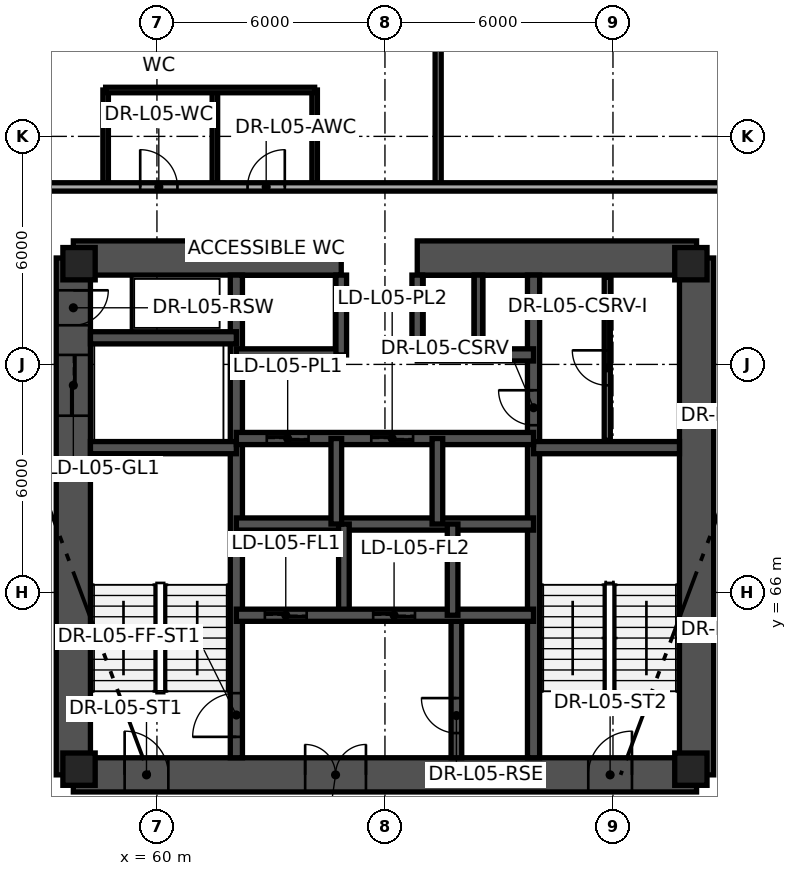
"""IFC4 building model, lengths in metres.
Left out: names, types, materials, properties, quantities, classifications, styles, units other than length and angle.
Written with IfcOpenShell. Run it as: python <this file> out.ifc"""

import sys

from ifc_helpers import new_model, si_unit, direction, frame, frame_2d, origin, origin_2d, place, context, subcontext, project, spatial, rectangle, extrude, element, fill, save


model = new_model("IFC4")
c1 = context("Model", 3, precision=1e-05, world=origin(), true_north=direction((0.0, 1.0)))
c2 = subcontext(c1, "Body", "Model", "MODEL_VIEW")
j1 = project(units=[si_unit("LENGTHUNIT", "METRE"), si_unit("PLANEANGLEUNIT", "RADIAN")], contexts=[c1])
p1 = place(None, origin())
s1 = spatial("IfcSite", under=j1, at=p1, CompositionType="ELEMENT")
p2 = place(p1, origin())
s2 = spatial("IfcBuilding", under=s1, at=p2, CompositionType="ELEMENT")
p3 = place(p2, frame((0.0, 0.0, 22.8)))
s3 = spatial("IfcBuildingStorey", under=s2, at=p3, CompositionType="ELEMENT", Elevation=22.8)
p4 = place(p3, frame((57.8, 61.2, 0.0), z_axis=(0.0, 0.0, 1.0), x_axis=(1.0, 0.0, 0.0)))
e1 = element("IfcWall", 1, at=p4, inside=s3, PredefinedType="SHEAR", context=c2, shape_type="SweptSolid", body=[
    extrude(rectangle(XDim=16.4, YDim=0.9, at=frame_2d((8.2, 0.0))), origin(), (0.0, 0.0, 1.0), 3.65),
])
p5 = place(p4, frame((1.35, 0.0, 0.0)))
e2 = element("IfcOpeningElement", 2, at=p5, cuts=e1, PredefinedType="OPENING", context=c2, shape_type="SweptSolid", body=[
    extrude(rectangle(XDim=1.15, YDim=2.15, at=frame_2d((0.575, 1.075))), frame((0.0, 0.46, 0.0), z_axis=(0.0, -1.0, 0.0), x_axis=(1.0, 0.0, 0.0)), (0.0, 0.0, 1.0), 0.92),
])
p6 = place(p4, frame((6.1, 0.0, 0.0)))
e3 = element("IfcOpeningElement", 3, at=p6, cuts=e1, PredefinedType="OPENING", context=c2, shape_type="SweptSolid", body=[
    extrude(rectangle(XDim=1.6, YDim=2.15, at=frame_2d((0.8, 1.075))), frame((0.0, 0.46, 0.0), z_axis=(0.0, -1.0, 0.0), x_axis=(1.0, 0.0, 0.0)), (0.0, 0.0, 1.0), 0.92),
])
p7 = place(p4, frame((13.55, 0.0, 0.0)))
e4 = element("IfcOpeningElement", 4, at=p7, cuts=e1, PredefinedType="OPENING", context=c2, shape_type="SweptSolid", body=[
    extrude(rectangle(XDim=1.15, YDim=2.15, at=frame_2d((0.575, 1.075))), frame((0.0, 0.46, 0.0), z_axis=(0.0, -1.0, 0.0), x_axis=(1.0, 0.0, 0.0)), (0.0, 0.0, 1.0), 0.92),
])
p8 = place(p3, frame((74.2, 61.2, 0.0), z_axis=(0.0, 0.0, 1.0), x_axis=(0.0, 1.0, 0.0)))
e5 = element("IfcWall", 5, at=p8, inside=s3, PredefinedType="SHEAR", context=c2, shape_type="SweptSolid", body=[
    extrude(rectangle(XDim=13.6, YDim=0.9, at=frame_2d((6.8, 0.0))), origin(), (0.0, 0.0, 1.0), 3.65),
])
p9 = place(p3, frame((74.2, 74.8, 0.0), z_axis=(0.0, 0.0, 1.0), x_axis=(-1.0, 0.0, 0.0)))
e6 = element("IfcWall", 6, at=p9, inside=s3, PredefinedType="SHEAR", context=c2, shape_type="SweptSolid", body=[
    extrude(rectangle(XDim=7.35, YDim=0.9, at=frame_2d((3.675, 0.0))), origin(), (0.0, 0.0, 1.0), 3.65),
])
p10 = place(p3, frame((64.85, 74.8, 0.0), z_axis=(0.0, 0.0, 1.0), x_axis=(-1.0, 0.0, 0.0)))
e7 = element("IfcWall", 7, at=p10, inside=s3, PredefinedType="SHEAR", context=c2, shape_type="SweptSolid", body=[
    extrude(rectangle(XDim=7.05, YDim=0.9, at=frame_2d((3.525, 0.0))), origin(), (0.0, 0.0, 1.0), 3.65),
])
p11 = place(p3, frame((57.8, 74.8, 0.0), z_axis=(0.0, 0.0, 1.0), x_axis=(0.0, -1.0, 0.0)))
e8 = element("IfcWall", 8, at=p11, inside=s3, PredefinedType="SHEAR", context=c2, shape_type="SweptSolid", body=[
    extrude(rectangle(XDim=13.6, YDim=0.9, at=frame_2d((6.8, 0.0))), origin(), (0.0, 0.0, 1.0), 3.65),
])
p12 = place(p11, frame((0.85, 0.0, 0.0)))
e9 = element("IfcOpeningElement", 9, at=p12, cuts=e8, PredefinedType="OPENING", context=c2, shape_type="SweptSolid", body=[
    extrude(rectangle(XDim=0.92, YDim=2.05, at=frame_2d((0.46, 1.025))), frame((0.0, 0.46, 0.0), z_axis=(0.0, -1.0, 0.0), x_axis=(1.0, 0.0, 0.0)), (0.0, 0.0, 1.0), 0.92),
])
p13 = place(p11, frame((2.55, 0.0, 0.0)))
e10 = element("IfcOpeningElement", 10, at=p13, cuts=e8, PredefinedType="OPENING", context=c2, shape_type="SweptSolid", body=[
    extrude(rectangle(XDim=1.6, YDim=2.3, at=frame_2d((0.8, 1.15))), frame((0.0, 0.46, 0.0), z_axis=(0.0, -1.0, 0.0), x_axis=(1.0, 0.0, 0.0)), (0.0, 0.0, 1.0), 0.92),
])
p14 = place(p3, frame((62.09, 61.65, 0.0), z_axis=(0.0, 0.0, 1.0), x_axis=(0.0, 1.0, 0.0)))
e11 = element("IfcWall", 11, at=p14, inside=s3, PredefinedType="SHEAR", context=c2, shape_type="SweptSolid", body=[
    extrude(rectangle(XDim=12.7, YDim=0.32, at=frame_2d((6.35, 0.0))), origin(), (0.0, 0.0, 1.0), 3.65),
])
p15 = place(p14, frame((0.55, 0.0, 0.0)))
e12 = element("IfcOpeningElement", 12, at=p15, cuts=e11, PredefinedType="OPENING", context=c2, shape_type="SweptSolid", body=[
    extrude(rectangle(XDim=1.15, YDim=2.15, at=frame_2d((0.575, 1.075))), frame((0.0, 0.17, 0.0), z_axis=(0.0, -1.0, 0.0), x_axis=(1.0, 0.0, 0.0)), (0.0, 0.0, 1.0), 0.34),
])
p16 = place(p3, frame((69.91, 61.65, 0.0), z_axis=(0.0, 0.0, 1.0), x_axis=(0.0, 1.0, 0.0)))
e13 = element("IfcWall", 13, at=p16, inside=s3, PredefinedType="SHEAR", context=c2, shape_type="SweptSolid", body=[
    extrude(rectangle(XDim=12.7, YDim=0.32, at=frame_2d((6.35, 0.0))), origin(), (0.0, 0.0, 1.0), 3.65),
])
p17 = place(p16, frame((8.75, 0.0, 0.0)))
e14 = element("IfcOpeningElement", 14, at=p17, cuts=e13, PredefinedType="OPENING", context=c2, shape_type="SweptSolid", body=[
    extrude(rectangle(XDim=0.92, YDim=2.05, at=frame_2d((0.46, 1.025))), frame((0.0, 0.17, 0.0), z_axis=(0.0, -1.0, 0.0), x_axis=(1.0, 0.0, 0.0)), (0.0, 0.0, 1.0), 0.34),
])
for number, where, z_axis, x_axis in (
    (15, (58.25, 69.81, 0.0), (0.0, 0.0, 1.0), (1.0, 0.0, 0.0)),
    (16, (69.91, 69.81, 0.0), (0.0, 0.0, 1.0), (1.0, 0.0, 0.0)),
    (17, (58.25, 72.7, 0.0), (0.0, 0.0, 1.0), (1.0, 0.0, 0.0)),
):
    element("IfcWall", number, at=place(p3, frame(where, z_axis=z_axis, x_axis=x_axis)), inside=s3, PredefinedType="SHEAR", context=c2, shape_type="SweptSolid", body=[
        extrude(rectangle(XDim=3.84, YDim=0.32, at=frame_2d((1.92, 0.0))), origin(), (0.0, 0.0, 1.0), 3.65),
    ])
p18 = place(p3, frame((62.09, 67.8, 0.0), z_axis=(0.0, 0.0, 1.0), x_axis=(1.0, 0.0, 0.0)))
e18 = element("IfcWall", 18, at=p18, inside=s3, PredefinedType="SHEAR", context=c2, shape_type="SweptSolid", body=[
    extrude(rectangle(XDim=7.82, YDim=0.32, at=frame_2d((3.91, 0.0))), origin(), (0.0, 0.0, 1.0), 3.65),
])
p19 = place(p3, frame((64.92, 65.4, 0.0), z_axis=(0.0, 0.0, 1.0), x_axis=(0.0, 1.0, 0.0)))
e19 = element("IfcWall", 19, at=p19, inside=s3, PredefinedType="SHEAR", context=c2, shape_type="SweptSolid", body=[
    extrude(rectangle(XDim=2.4, YDim=0.28, at=frame_2d((1.2, 0.0))), origin(), (0.0, 0.0, 1.0), 3.65),
])
p20 = place(p3, frame((62.09, 70.05, 0.0), z_axis=(0.0, 0.0, 1.0), x_axis=(1.0, 0.0, 0.0)))
e20 = element("IfcWall", 20, at=p20, inside=s3, PredefinedType="SHEAR", context=c2, shape_type="SweptSolid", body=[
    extrude(rectangle(XDim=7.82, YDim=0.32, at=frame_2d((3.91, 0.0))), origin(), (0.0, 0.0, 1.0), 3.65),
])
p21 = place(p20, frame((0.8, 0.0, 0.0)))
e21 = element("IfcOpeningElement", 21, at=p21, cuts=e20, PredefinedType="OPENING", context=c2, shape_type="SweptSolid", body=[
    extrude(rectangle(XDim=1.1, YDim=2.2, at=frame_2d((0.55, 1.1))), frame((0.0, 0.17, 0.0), z_axis=(0.0, -1.0, 0.0), x_axis=(1.0, 0.0, 0.0)), (0.0, 0.0, 1.0), 0.34),
])
p22 = place(p20, frame((3.55, 0.0, 0.0)))
e22 = element("IfcOpeningElement", 22, at=p22, cuts=e20, PredefinedType="OPENING", context=c2, shape_type="SweptSolid", body=[
    extrude(rectangle(XDim=1.1, YDim=2.2, at=frame_2d((0.55, 1.1))), frame((0.0, 0.17, 0.0), z_axis=(0.0, -1.0, 0.0), x_axis=(1.0, 0.0, 0.0)), (0.0, 0.0, 1.0), 0.34),
])
p23 = place(p3, frame((62.09, 72.25, 0.0), z_axis=(0.0, 0.0, 1.0), x_axis=(1.0, 0.0, 0.0)))
e23 = element("IfcWall", 23, at=p23, inside=s3, PredefinedType="SHEAR", context=c2, shape_type="SweptSolid", body=[
    extrude(rectangle(XDim=2.76, YDim=0.32, at=frame_2d((1.38, 0.0))), origin(), (0.0, 0.0, 1.0), 3.65),
])
p24 = place(p3, frame((66.85, 72.25, 0.0), z_axis=(0.0, 0.0, 1.0), x_axis=(1.0, 0.0, 0.0)))
e24 = element("IfcWall", 24, at=p24, inside=s3, PredefinedType="SHEAR", context=c2, shape_type="SweptSolid", body=[
    extrude(rectangle(XDim=3.06, YDim=0.32, at=frame_2d((1.53, 0.0))), origin(), (0.0, 0.0, 1.0), 3.65),
])
for number, where, z_axis, x_axis in (
    (25, (64.85, 72.25, 0.0), (0.0, 0.0, 1.0), (0.0, 1.0, 0.0)),
    (26, (66.85, 72.25, 0.0), (0.0, 0.0, 1.0), (0.0, 1.0, 0.0)),
):
    element("IfcWall", number, at=place(p3, frame(where, z_axis=z_axis, x_axis=x_axis)), inside=s3, PredefinedType="SHEAR", context=c2, shape_type="SweptSolid", body=[
        extrude(rectangle(XDim=2.1, YDim=0.28, at=frame_2d((1.05, 0.0))), origin(), (0.0, 0.0, 1.0), 3.65),
    ])
p25 = place(p3, frame((68.46, 72.25, 0.0), z_axis=(0.0, 0.0, 1.0), x_axis=(0.0, 1.0, 0.0)))
e27 = element("IfcWall", 27, at=p25, inside=s3, PredefinedType="SHEAR", context=c2, shape_type="SweptSolid", body=[
    extrude(rectangle(XDim=2.1, YDim=0.22, at=frame_2d((1.05, 0.0))), origin(), (0.0, 0.0, 1.0), 3.65),
])
p26 = place(p3, frame((67.88, 61.65, 0.0), z_axis=(0.0, 0.0, 1.0), x_axis=(0.0, 1.0, 0.0)))
e28 = element("IfcWall", 28, at=p26, inside=s3, PredefinedType="SHEAR", context=c2, shape_type="SweptSolid", body=[
    extrude(rectangle(XDim=3.75, YDim=0.28, at=frame_2d((1.875, 0.0))), origin(), (0.0, 0.0, 1.0), 3.65),
])
p27 = place(p26, frame((0.65, 0.0, 0.0)))
e29 = element("IfcOpeningElement", 29, at=p27, cuts=e28, PredefinedType="OPENING", context=c2, shape_type="SweptSolid", body=[
    extrude(rectangle(XDim=0.92, YDim=2.05, at=frame_2d((0.46, 1.025))), frame((0.0, 0.15, 0.0), z_axis=(0.0, -1.0, 0.0), x_axis=(1.0, 0.0, 0.0)), (0.0, 0.0, 1.0), 0.3),
])
p28 = place(p3, frame((62.09, 65.4, 0.0), z_axis=(0.0, 0.0, 1.0), x_axis=(1.0, 0.0, 0.0)))
e30 = element("IfcWall", 30, at=p28, inside=s3, PredefinedType="SHEAR", context=c2, shape_type="SweptSolid", body=[
    extrude(rectangle(XDim=7.82, YDim=0.32, at=frame_2d((3.91, 0.0))), origin(), (0.0, 0.0, 1.0), 3.65),
])
p29 = place(p28, frame((0.75, 0.0, 0.0)))
e31 = element("IfcOpeningElement", 31, at=p29, cuts=e30, PredefinedType="OPENING", context=c2, shape_type="SweptSolid", body=[
    extrude(rectangle(XDim=1.1, YDim=2.2, at=frame_2d((0.55, 1.1))), frame((0.0, 0.17, 0.0), z_axis=(0.0, -1.0, 0.0), x_axis=(1.0, 0.0, 0.0)), (0.0, 0.0, 1.0), 0.34),
])
p30 = place(p28, frame((3.6, 0.0, 0.0)))
e32 = element("IfcOpeningElement", 32, at=p30, cuts=e30, PredefinedType="OPENING", context=c2, shape_type="SweptSolid", body=[
    extrude(rectangle(XDim=1.1, YDim=2.2, at=frame_2d((0.55, 1.1))), frame((0.0, 0.17, 0.0), z_axis=(0.0, -1.0, 0.0), x_axis=(1.0, 0.0, 0.0)), (0.0, 0.0, 1.0), 0.34),
])
p31 = place(p3, frame((67.78, 65.4, 0.0), z_axis=(0.0, 0.0, 1.0), x_axis=(0.0, 1.0, 0.0)))
e33 = element("IfcWall", 33, at=p31, inside=s3, PredefinedType="SHEAR", context=c2, shape_type="SweptSolid", body=[
    extrude(rectangle(XDim=2.4, YDim=0.28, at=frame_2d((1.2, 0.0))), origin(), (0.0, 0.0, 1.0), 3.65),
])
for number, where, z_axis, x_axis in (
    (34, (64.72, 67.8, 0.0), (0.0, 0.0, 1.0), (0.0, 1.0, 0.0)),
    (35, (67.38, 67.8, 0.0), (0.0, 0.0, 1.0), (0.0, 1.0, 0.0)),
):
    element("IfcWall", number, at=place(p3, frame(where, z_axis=z_axis, x_axis=x_axis)), inside=s3, PredefinedType="SHEAR", context=c2, shape_type="SweptSolid", body=[
        extrude(rectangle(XDim=2.25, YDim=0.28, at=frame_2d((1.125, 0.0))), origin(), (0.0, 0.0, 1.0), 3.65),
    ])
for number, where, z_axis, x_axis in (
    (36, (57.95, 61.35, 0.0), (0.0, 0.0, 1.0), (1.0, 0.0, 0.0)),
    (37, (74.05, 61.35, 0.0), (0.0, 0.0, 1.0), (1.0, 0.0, 0.0)),
    (38, (74.05, 74.65, 0.0), (0.0, 0.0, 1.0), (1.0, 0.0, 0.0)),
    (39, (57.95, 74.65, 0.0), (0.0, 0.0, 1.0), (1.0, 0.0, 0.0)),
):
    element("IfcColumn", number, at=place(p3, frame(where, z_axis=z_axis, x_axis=x_axis)), inside=s3, PredefinedType="COLUMN", context=c2, shape_type="SweptSolid", body=[
        extrude(rectangle(XDim=0.85, YDim=0.85, at=origin_2d()), origin(), (0.0, 0.0, 1.0), 3.65),
    ])
p32 = place(p3, frame((61.237, 17.689, 0.0), z_axis=(0.0, 0.0, 1.0), x_axis=(-0.401346447851, 0.9159263228, 0.0)))
e40 = element("IfcWall", 40, at=p32, inside=s3, PredefinedType="STANDARD", context=c2, shape_type="SweptSolid", body=[
    extrude(rectangle(XDim=50.047, YDim=0.34, at=frame_2d((25.023, 0.0))), origin(), (0.0, 0.0, 1.0), 0.85),
])
p33 = place(p3, frame((100.375, 85.267, 0.0), z_axis=(0.0, 0.0, 1.0), x_axis=(-0.401347685244, -0.91592578059, 0.0)))
e41 = element("IfcWall", 41, at=p33, inside=s3, PredefinedType="STANDARD", context=c2, shape_type="SweptSolid", body=[
    extrude(rectangle(XDim=73.781, YDim=0.34, at=frame_2d((36.891, 0.0))), origin(), (0.0, 0.0, 1.0), 0.85),
])
p34 = place(p3, frame((71.85, 70.0, 0.0), z_axis=(0.0, 0.0, 1.0), x_axis=(0.0, 1.0, 0.0)))
e42 = element("IfcWall", 42, at=p34, inside=s3, PredefinedType="PARTITIONING", context=c2, shape_type="SweptSolid", body=[
    extrude(rectangle(XDim=4.3, YDim=0.16, at=frame_2d((2.15, 0.0))), origin(), (0.0, 0.0, 1.0), 3.375),
])
p35 = place(p34, frame((1.45, 0.0, 0.0)))
e43 = element("IfcOpeningElement", 43, at=p35, cuts=e42, PredefinedType="OPENING", context=c2, shape_type="SweptSolid", body=[
    extrude(rectangle(XDim=0.92, YDim=2.05, at=frame_2d((0.46, 1.025))), frame((0.0, 0.09, 0.0), z_axis=(0.0, -1.0, 0.0), x_axis=(1.0, 0.0, 0.0)), (0.0, 0.0, 1.0), 0.18),
])
for number, where, z_axis, x_axis in (
    (44, (58.65, 76.67, 0.0), (0.0, 0.0, 1.0), (0.0, 1.0, 0.0)),
    (45, (61.525, 76.67, 0.0), (0.0, 0.0, 1.0), (0.0, 1.0, 0.0)),
    (46, (64.15, 76.67, 0.0), (0.0, 0.0, 1.0), (0.0, 1.0, 0.0)),
):
    element("IfcWall", number, at=place(p3, frame(where, z_axis=z_axis, x_axis=x_axis)), inside=s3, PredefinedType="PARTITIONING", context=c2, shape_type="SweptSolid", body=[
        extrude(rectangle(XDim=2.55, YDim=0.145, at=frame_2d((1.275, 0.0))), origin(), (0.0, 0.0, 1.0), 3.375),
    ])
p36 = place(p3, frame((58.65, 79.22, 0.0), z_axis=(0.0, 0.0, 1.0), x_axis=(1.0, 0.0, 0.0)))
e47 = element("IfcWall", 47, at=p36, inside=s3, PredefinedType="PARTITIONING", context=c2, shape_type="SweptSolid", body=[
    extrude(rectangle(XDim=5.5, YDim=0.145, at=frame_2d((2.75, 0.0))), origin(), (0.0, 0.0, 1.0), 3.375),
])
p37 = place(p3, frame((67.4, 76.67, 0.0), z_axis=(0.0, 0.0, 1.0), x_axis=(0.0, 1.0, 0.0)))
e48 = element("IfcWall", 48, at=p37, inside=s3, PredefinedType="PARTITIONING", context=c2, shape_type="SweptSolid", body=[
    extrude(rectangle(XDim=15.799, YDim=0.16, at=frame_2d((7.9, 0.0))), origin(), (0.0, 0.0, 1.0), 2.505),
])
p38 = place(p3, frame((35.486, 76.67, 0.0), z_axis=(0.0, 0.0, 1.0), x_axis=(1.0, 0.0, 0.0)))
e49 = element("IfcWall", 49, at=p38, inside=s3, PredefinedType="PARTITIONING", context=c2, shape_type="SweptSolid", body=[
    extrude(rectangle(XDim=61.029, YDim=0.22, at=frame_2d((30.514, 0.0))), origin(), (0.0, 0.0, 1.0), 2.505),
])
p39 = place(p38, frame((24.074, 0.0, 0.0)))
e50 = element("IfcOpeningElement", 50, at=p39, cuts=e49, PredefinedType="OPENING", context=c2, shape_type="SweptSolid", body=[
    extrude(rectangle(XDim=0.98, YDim=2.1, at=frame_2d((0.49, 1.05))), frame((0.0, 0.12, 0.0), z_axis=(0.0, -1.0, 0.0), x_axis=(1.0, 0.0, 0.0)), (0.0, 0.0, 1.0), 0.24),
])
p40 = place(p38, frame((26.899, 0.0, 0.0)))
e51 = element("IfcOpeningElement", 51, at=p40, cuts=e49, PredefinedType="OPENING", context=c2, shape_type="SweptSolid", body=[
    extrude(rectangle(XDim=0.98, YDim=2.1, at=frame_2d((0.49, 1.05))), frame((0.0, 0.12, 0.0), z_axis=(0.0, -1.0, 0.0), x_axis=(1.0, 0.0, 0.0)), (0.0, 0.0, 1.0), 0.24),
])
p41 = place(p38, frame((11.117, 0.0, 0.0)))
e52 = element("IfcOpeningElement", 52, at=p41, cuts=e49, PredefinedType="OPENING", context=c2, shape_type="SweptSolid", body=[
    extrude(rectangle(XDim=1.0, YDim=2.1, at=frame_2d((0.5, 1.05))), frame((0.0, 0.12, 0.0), z_axis=(0.0, -1.0, 0.0), x_axis=(1.0, 0.0, 0.0)), (0.0, 0.0, 1.0), 0.24),
])
p42 = place(p38, frame((41.783, 0.0, 0.0)))
e53 = element("IfcOpeningElement", 53, at=p42, cuts=e49, PredefinedType="OPENING", context=c2, shape_type="SweptSolid", body=[
    extrude(rectangle(XDim=1.0, YDim=2.1, at=frame_2d((0.5, 1.05))), frame((0.0, 0.12, 0.0), z_axis=(0.0, -1.0, 0.0), x_axis=(1.0, 0.0, 0.0)), (0.0, 0.0, 1.0), 0.24),
])
p43 = place(p15, origin())
e54 = element("IfcDoor", 54, at=p43, inside=s3, OperationType="SINGLE_SWING_LEFT", PredefinedType="DOOR", context=c2, shape_type="SweptSolid", body=[
    extrude(rectangle(XDim=1.15, YDim=2.15, at=frame_2d((0.575, 1.075))), frame((0.0, 0.025, 0.0), z_axis=(0.0, -1.0, 0.0), x_axis=(1.0, 0.0, 0.0)), (0.0, 0.0, 1.0), 0.05),
])
fill(e12, e54)
p44 = place(p27, origin())
e55 = element("IfcDoor", 55, at=p44, inside=s3, OperationType="SINGLE_SWING_RIGHT", PredefinedType="DOOR", context=c2, shape_type="SweptSolid", body=[
    extrude(rectangle(XDim=0.92, YDim=2.05, at=frame_2d((0.46, 1.025))), frame((0.0, 0.025, 0.0), z_axis=(0.0, -1.0, 0.0), x_axis=(1.0, 0.0, 0.0)), (0.0, 0.0, 1.0), 0.05),
])
fill(e29, e55)
p45 = place(p29, origin())
e56 = element("IfcDoor", 56, at=p45, inside=s3, OperationType="SLIDING_TO_LEFT", PredefinedType="DOOR", context=c2, shape_type="SweptSolid", body=[
    extrude(rectangle(XDim=1.1, YDim=2.2, at=frame_2d((0.55, 1.1))), frame((0.0, 0.025, 0.0), z_axis=(0.0, -1.0, 0.0), x_axis=(1.0, 0.0, 0.0)), (0.0, 0.0, 1.0), 0.05),
])
fill(e31, e56)
p46 = place(p30, origin())
e57 = element("IfcDoor", 57, at=p46, inside=s3, OperationType="SLIDING_TO_LEFT", PredefinedType="DOOR", context=c2, shape_type="SweptSolid", body=[
    extrude(rectangle(XDim=1.1, YDim=2.2, at=frame_2d((0.55, 1.1))), frame((0.0, 0.025, 0.0), z_axis=(0.0, -1.0, 0.0), x_axis=(1.0, 0.0, 0.0)), (0.0, 0.0, 1.0), 0.05),
])
fill(e32, e57)
p47 = place(p21, origin())
e58 = element("IfcDoor", 58, at=p47, inside=s3, OperationType="SLIDING_TO_LEFT", PredefinedType="DOOR", context=c2, shape_type="SweptSolid", body=[
    extrude(rectangle(XDim=1.1, YDim=2.2, at=frame_2d((0.55, 1.1))), frame((0.0, 0.025, 0.0), z_axis=(0.0, -1.0, 0.0), x_axis=(1.0, 0.0, 0.0)), (0.0, 0.0, 1.0), 0.05),
])
fill(e21, e58)
p48 = place(p22, origin())
e59 = element("IfcDoor", 59, at=p48, inside=s3, OperationType="SLIDING_TO_LEFT", PredefinedType="DOOR", context=c2, shape_type="SweptSolid", body=[
    extrude(rectangle(XDim=1.1, YDim=2.2, at=frame_2d((0.55, 1.1))), frame((0.0, 0.025, 0.0), z_axis=(0.0, -1.0, 0.0), x_axis=(1.0, 0.0, 0.0)), (0.0, 0.0, 1.0), 0.05),
])
fill(e22, e59)
p49 = place(p5, origin())
e60 = element("IfcDoor", 60, at=p49, inside=s3, OperationType="SINGLE_SWING_LEFT", PredefinedType="DOOR", context=c2, shape_type="SweptSolid", body=[
    extrude(rectangle(XDim=1.15, YDim=2.15, at=frame_2d((0.575, 1.075))), frame((0.0, 0.025, 0.0), z_axis=(0.0, -1.0, 0.0), x_axis=(1.0, 0.0, 0.0)), (0.0, 0.0, 1.0), 0.05),
])
fill(e2, e60)
p50 = place(p6, origin())
e61 = element("IfcDoor", 61, at=p50, inside=s3, OperationType="DOUBLE_DOOR_SINGLE_SWING", PredefinedType="DOOR", context=c2, shape_type="SweptSolid", body=[
    extrude(rectangle(XDim=1.6, YDim=2.15, at=frame_2d((0.8, 1.075))), frame((0.0, 0.025, 0.0), z_axis=(0.0, -1.0, 0.0), x_axis=(1.0, 0.0, 0.0)), (0.0, 0.0, 1.0), 0.05),
])
fill(e3, e61)
p51 = place(p7, origin())
e62 = element("IfcDoor", 62, at=p51, inside=s3, OperationType="SINGLE_SWING_RIGHT", PredefinedType="DOOR", context=c2, shape_type="SweptSolid", body=[
    extrude(rectangle(XDim=1.15, YDim=2.15, at=frame_2d((0.575, 1.075))), frame((0.0, 0.025, 0.0), z_axis=(0.0, -1.0, 0.0), x_axis=(1.0, 0.0, 0.0)), (0.0, 0.0, 1.0), 0.05),
])
fill(e4, e62)
p52 = place(p12, origin())
e63 = element("IfcDoor", 63, at=p52, inside=s3, OperationType="SINGLE_SWING_LEFT", PredefinedType="DOOR", context=c2, shape_type="SweptSolid", body=[
    extrude(rectangle(XDim=0.92, YDim=2.05, at=frame_2d((0.46, 1.025))), frame((0.0, 0.025, 0.0), z_axis=(0.0, -1.0, 0.0), x_axis=(1.0, 0.0, 0.0)), (0.0, 0.0, 1.0), 0.05),
])
fill(e9, e63)
p53 = place(p13, origin())
e64 = element("IfcDoor", 64, at=p53, inside=s3, OperationType="DOUBLE_DOOR_SLIDING", PredefinedType="DOOR", context=c2, shape_type="SweptSolid", body=[
    extrude(rectangle(XDim=1.6, YDim=2.3, at=frame_2d((0.8, 1.15))), frame((0.0, 0.025, 0.0), z_axis=(0.0, -1.0, 0.0), x_axis=(1.0, 0.0, 0.0)), (0.0, 0.0, 1.0), 0.05),
])
fill(e10, e64)
p54 = place(p17, origin())
e65 = element("IfcDoor", 65, at=p54, inside=s3, OperationType="SINGLE_SWING_RIGHT", PredefinedType="DOOR", context=c2, shape_type="SweptSolid", body=[
    extrude(rectangle(XDim=0.92, YDim=2.05, at=frame_2d((0.46, 1.025))), frame((0.0, 0.025, 0.0), z_axis=(0.0, -1.0, 0.0), x_axis=(1.0, 0.0, 0.0)), (0.0, 0.0, 1.0), 0.05),
])
fill(e14, e65)
p55 = place(p35, origin())
e66 = element("IfcDoor", 66, at=p55, inside=s3, OperationType="SINGLE_SWING_RIGHT", PredefinedType="DOOR", context=c2, shape_type="SweptSolid", body=[
    extrude(rectangle(XDim=0.92, YDim=2.05, at=frame_2d((0.46, 1.025))), frame((0.0, 0.025, 0.0), z_axis=(0.0, -1.0, 0.0), x_axis=(1.0, 0.0, 0.0)), (0.0, 0.0, 1.0), 0.05),
])
fill(e43, e66)
p56 = place(p39, origin())
e67 = element("IfcDoor", 67, at=p56, inside=s3, OperationType="SINGLE_SWING_LEFT", PredefinedType="DOOR", context=c2, shape_type="SweptSolid", body=[
    extrude(rectangle(XDim=0.98, YDim=2.1, at=frame_2d((0.49, 1.05))), frame((0.0, 0.025, 0.0), z_axis=(0.0, -1.0, 0.0), x_axis=(1.0, 0.0, 0.0)), (0.0, 0.0, 1.0), 0.05),
])
fill(e50, e67)
p57 = place(p40, origin())
e68 = element("IfcDoor", 68, at=p57, inside=s3, OperationType="SINGLE_SWING_RIGHT", PredefinedType="DOOR", context=c2, shape_type="SweptSolid", body=[
    extrude(rectangle(XDim=0.98, YDim=2.1, at=frame_2d((0.49, 1.05))), frame((0.0, 0.025, 0.0), z_axis=(0.0, -1.0, 0.0), x_axis=(1.0, 0.0, 0.0)), (0.0, 0.0, 1.0), 0.05),
])
fill(e51, e68)
save(model, sys.argv[1])
